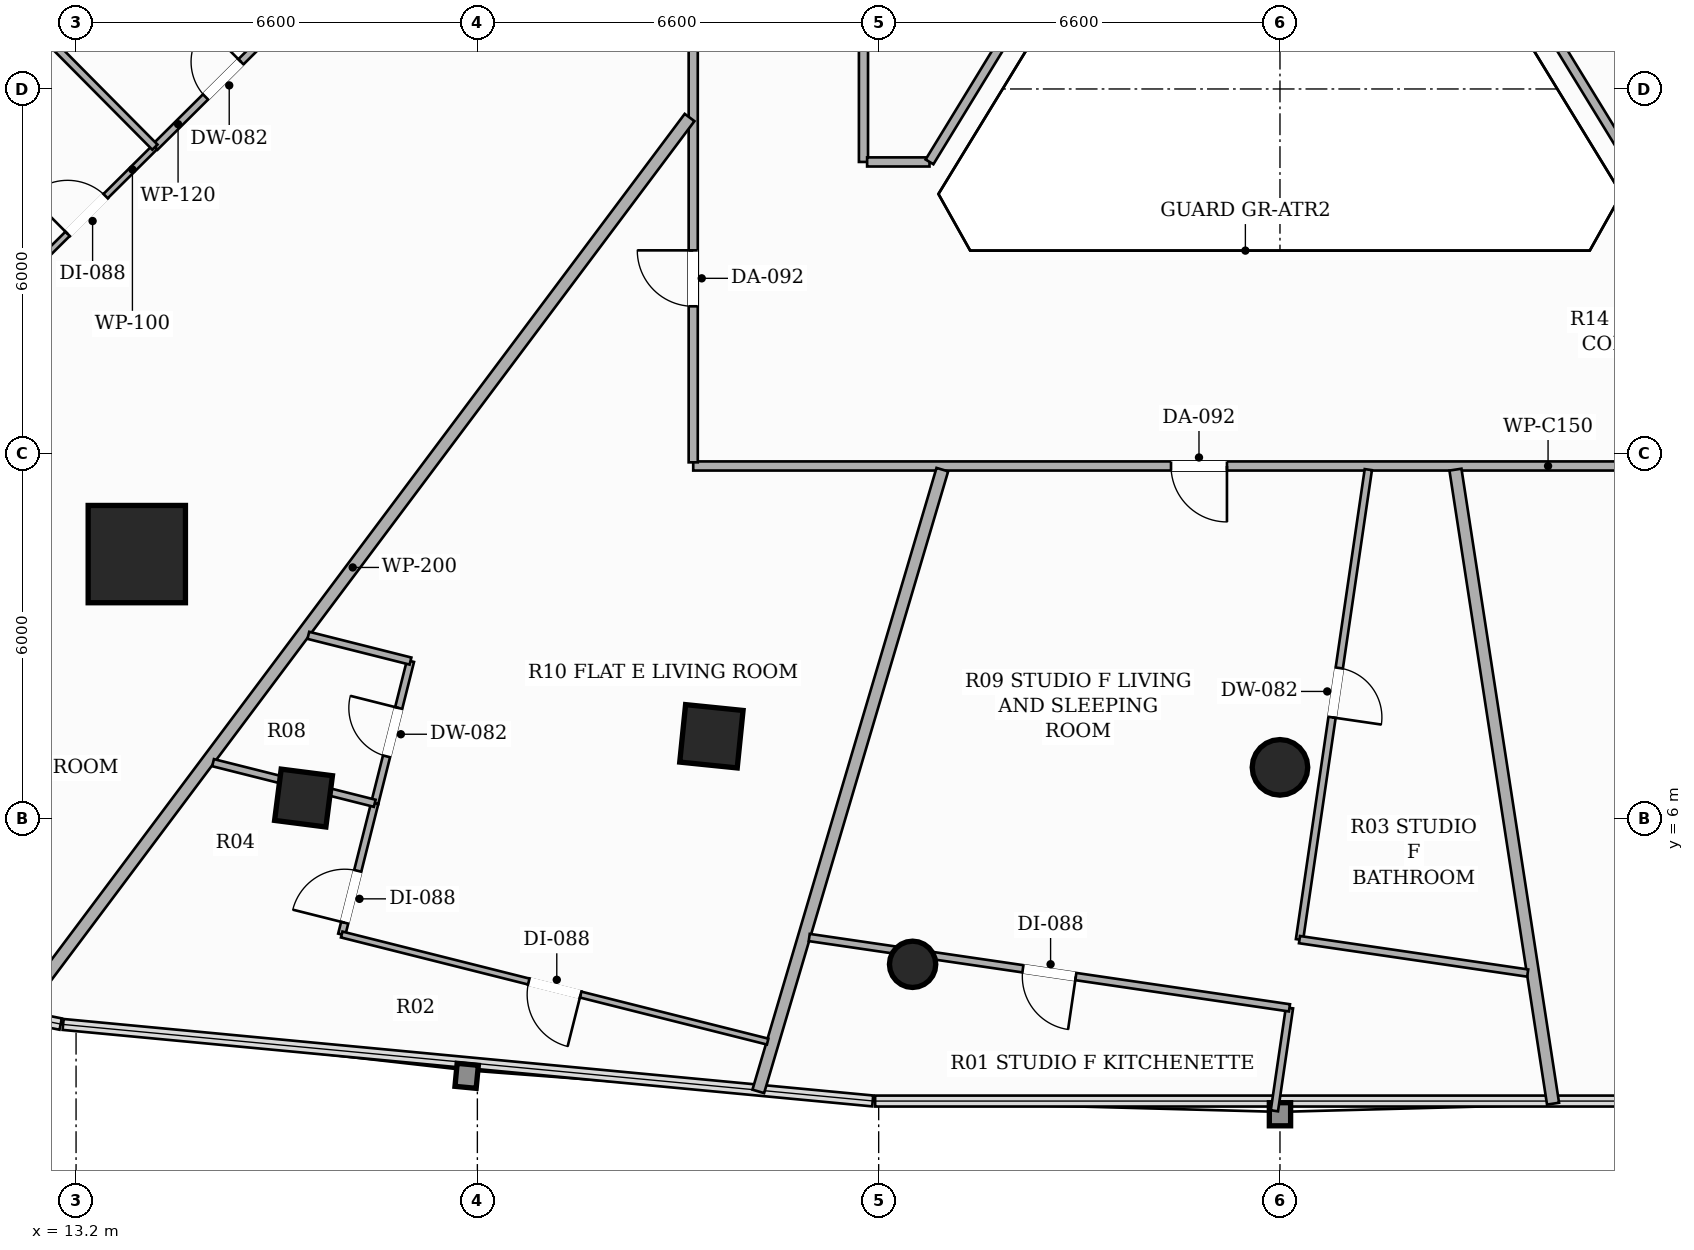
"""IFC4 building model, lengths in metres.
Left out: names, types, materials, properties, quantities, classifications, styles, units other than length and angle.
Written with IfcOpenShell. Run it as: python <this file> out.ifc"""

import sys

from ifc_helpers import new_model, si_unit, direction, frame, frame_2d, origin, origin_2d, place, context, subcontext, project, spatial, rectangle, hollow_rectangle, hollow_circle, extrude, element, fill, save


model = new_model("IFC4")
c1 = context("Model", 3, precision=1e-05, world=origin(), true_north=direction((0.0, 1.0)))
c2 = subcontext(c1, "Body", "Model", "MODEL_VIEW")
j1 = project(units=[si_unit("LENGTHUNIT", "METRE"), si_unit("PLANEANGLEUNIT", "RADIAN")], contexts=[c1])
p1 = place(None, origin())
s1 = spatial("IfcSite", under=j1, at=p1, CompositionType="ELEMENT")
p2 = place(p1, origin())
s2 = spatial("IfcBuilding", under=s1, at=p2, CompositionType="ELEMENT")
p3 = place(p2, frame((0.0, 0.0, 33.5)))
s3 = spatial("IfcBuildingStorey", under=s2, at=p3, CompositionType="ELEMENT", Elevation=33.5)
p4 = place(p3, frame((14.199, 10.351, 0.0), z_axis=(0.0, 0.0, 1.0), x_axis=(1.0, 0.0, 0.0)))
e1 = element("IfcColumn", 1, at=p4, inside=s3, PredefinedType="COLUMN", context=c2, shape_type="SweptSolid", body=[
    extrude(hollow_rectangle(XDim=1.6, YDim=1.6, WallThickness=0.05, at=origin_2d()), origin(), (0.0, 0.0, 1.0), 3.3),
])
p5 = place(p3, frame((23.649, 7.355, 0.0), z_axis=(0.0, 0.0, 1.0), x_axis=(-0.994880708829, 0.101056297183, 0.0)))
e2 = element("IfcColumn", 2, at=p5, inside=s3, PredefinedType="COLUMN", context=c2, shape_type="SweptSolid", body=[
    extrude(hollow_rectangle(XDim=0.95, YDim=0.95, WallThickness=0.032, at=origin_2d()), origin(), (0.0, 0.0, 1.0), 3.3),
])
p6 = place(p3, frame((33.0, 6.844, 0.0), z_axis=(0.0, 0.0, 1.0), x_axis=(1.0, 0.0, 0.0)))
e3 = element("IfcColumn", 3, at=p6, inside=s3, PredefinedType="COLUMN", context=c2, shape_type="SweptSolid", body=[
    extrude(hollow_circle(Radius=0.457, WallThickness=0.025, at=origin_2d()), origin(), (0.0, 0.0, 1.0), 3.3),
])
p7 = place(p3, frame((16.941, 6.339, 0.0), z_axis=(0.0, 0.0, 1.0), x_axis=(-0.99189444259, 0.127064608601, 0.0)))
e4 = element("IfcColumn", 4, at=p7, inside=s3, PredefinedType="COLUMN", context=c2, shape_type="SweptSolid", body=[
    extrude(hollow_rectangle(XDim=0.85, YDim=0.85, WallThickness=0.028, at=origin_2d()), origin(), (0.0, 0.0, 1.0), 3.3),
])
p8 = place(p3, frame((26.958, 3.605, 0.0), z_axis=(0.0, 0.0, 1.0), x_axis=(1.0, 0.0, 0.0)))
e5 = element("IfcColumn", 5, at=p8, inside=s3, PredefinedType="COLUMN", context=c2, shape_type="SweptSolid", body=[
    extrude(hollow_circle(Radius=0.381, WallThickness=0.022, at=origin_2d()), origin(), (0.0, 0.0, 1.0), 3.3),
])
p9 = place(p3, frame((42.59, 11.8, 0.0), z_axis=(0.0, 0.0, 1.0), x_axis=(-1.0, 0.0, 0.0)))
e6 = element("IfcWall", 6, at=p9, inside=s3, PredefinedType="PARTITIONING", context=c2, shape_type="SweptSolid", body=[
    extrude(rectangle(XDim=19.24, YDim=0.15, at=frame_2d((9.62, 0.0))), origin(), (0.0, 0.0, 1.0), 2.669),
])
p10 = place(p9, frame((10.462, 0.0, 0.0)))
e7 = element("IfcOpeningElement", 7, at=p10, cuts=e6, PredefinedType="OPENING", context=c2, shape_type="SweptSolid", body=[
    extrude(rectangle(XDim=0.92, YDim=2.15, at=frame_2d((0.46, 1.075))), frame((0.0, 0.085, 0.0), z_axis=(0.0, -1.0, 0.0), x_axis=(1.0, 0.0, 0.0)), (0.0, 0.0, 1.0), 0.17),
])
p11 = place(p3, frame((23.35, 11.86, 0.0), z_axis=(0.0, 0.0, 1.0), x_axis=(0.0, 1.0, 0.0)))
e8 = element("IfcWall", 8, at=p11, inside=s3, PredefinedType="PARTITIONING", context=c2, shape_type="SweptSolid", body=[
    extrude(rectangle(XDim=25.04, YDim=0.15, at=frame_2d((12.52, 0.0))), origin(), (0.0, 0.0, 1.0), 2.413),
])
p12 = place(p11, frame((9.29, 0.0, 0.0)))
e9 = element("IfcOpeningElement", 9, at=p12, cuts=e8, PredefinedType="OPENING", context=c2, shape_type="SweptSolid", body=[
    extrude(rectangle(XDim=0.92, YDim=2.15, at=frame_2d((0.46, 1.075))), frame((0.0, 0.085, 0.0), z_axis=(0.0, -1.0, 0.0), x_axis=(1.0, 0.0, 0.0)), (0.0, 0.0, 1.0), 0.17),
])
p13 = place(p11, frame((18.865, 0.0, 0.0)))
e10 = element("IfcOpeningElement", 10, at=p13, cuts=e8, PredefinedType="OPENING", context=c2, shape_type="SweptSolid", body=[
    extrude(rectangle(XDim=0.88, YDim=2.1, at=frame_2d((0.44, 1.05))), frame((0.0, 0.085, 0.0), z_axis=(0.0, -1.0, 0.0), x_axis=(1.0, 0.0, 0.0)), (0.0, 0.0, 1.0), 0.17),
])
p14 = place(p11, frame((2.566, 0.0, 0.0)))
e11 = element("IfcOpeningElement", 11, at=p14, cuts=e8, PredefinedType="OPENING", context=c2, shape_type="SweptSolid", body=[
    extrude(rectangle(XDim=0.92, YDim=2.15, at=frame_2d((0.46, 1.075))), frame((0.0, 0.085, 0.0), z_axis=(0.0, -1.0, 0.0), x_axis=(1.0, 0.0, 0.0)), (0.0, 0.0, 1.0), 0.17),
])
p15 = place(p3, frame((26.15, 23.79, 0.0), z_axis=(0.0, 0.0, 1.0), x_axis=(0.0, -1.0, 0.0)))
e12 = element("IfcWall", 12, at=p15, inside=s3, PredefinedType="PARTITIONING", context=c2, shape_type="SweptSolid", body=[
    extrude(rectangle(XDim=6.99, YDim=0.15, at=frame_2d((3.495, 0.0))), origin(), (0.0, 0.0, 1.0), 2.669),
])
p16 = place(p15, frame((3.055, 0.0, 0.0)))
e13 = element("IfcOpeningElement", 13, at=p16, cuts=e12, PredefinedType="OPENING", context=c2, shape_type="SweptSolid", body=[
    extrude(rectangle(XDim=0.88, YDim=2.1, at=frame_2d((0.44, 1.05))), frame((0.0, 0.085, 0.0), z_axis=(0.0, -1.0, 0.0), x_axis=(1.0, 0.0, 0.0)), (0.0, 0.0, 1.0), 0.17),
])
p17 = place(p3, frame((26.21, 16.8, 0.0), z_axis=(0.0, 0.0, 1.0), x_axis=(1.0, 0.0, 0.0)))
e14 = element("IfcWall", 14, at=p17, inside=s3, PredefinedType="PARTITIONING", context=c2, shape_type="SweptSolid", body=[
    extrude(rectangle(XDim=1.026, YDim=0.15, at=frame_2d((0.513, 0.0))), origin(), (0.0, 0.0, 1.0), 3.06),
])
p18 = place(p3, frame((27.236, 16.801, 0.0), z_axis=(0.0, 0.0, 1.0), x_axis=(0.521617567684, 0.853179414358, 0.0)))
e15 = element("IfcWall", 15, at=p18, inside=s3, PredefinedType="PARTITIONING", context=c2, shape_type="SweptSolid", body=[
    extrude(rectangle(XDim=8.192, YDim=0.15, at=frame_2d((4.096, 0.0))), origin(), (0.0, 0.0, 1.0), 2.669),
])
p19 = place(p3, frame((34.486, 23.79, 0.0), z_axis=(0.0, 0.0, 1.0), x_axis=(0.521998190399, -0.852946592244, 0.0)))
e16 = element("IfcWall", 16, at=p19, inside=s3, PredefinedType="PARTITIONING", context=c2, shape_type="SweptSolid", body=[
    extrude(rectangle(XDim=8.195, YDim=0.15, at=frame_2d((4.098, 0.0))), origin(), (0.0, 0.0, 1.0), 2.669),
])
p20 = place(p3, frame((23.29, 17.531, 0.0), z_axis=(0.0, 0.0, 1.0), x_axis=(-0.599334217596, -0.800498904196, 0.0)))
e17 = element("IfcWall", 17, at=p20, inside=s3, PredefinedType="PARTITIONING", context=c2, shape_type="SweptSolid", body=[
    extrude(rectangle(XDim=18.487, YDim=0.2, at=frame_2d((9.244, 0.0))), origin(), (0.0, 0.0, 1.0), 2.413),
])
p21 = place(p3, frame((37.491, 1.313, 0.0), z_axis=(0.0, 0.0, 1.0), x_axis=(-0.152133698634, 0.988359923176, 0.0)))
e18 = element("IfcWall", 18, at=p21, inside=s3, PredefinedType="PARTITIONING", context=c2, shape_type="SweptSolid", body=[
    extrude(rectangle(XDim=10.55, YDim=0.2, at=frame_2d((5.275, 0.0))), origin(), (0.0, 0.0, 1.0), 2.413),
])
p22 = place(p3, frame((27.447, 11.74, 0.0), z_axis=(0.0, 0.0, 1.0), x_axis=(-0.283867721737, -0.958863450422, 0.0)))
e19 = element("IfcWall", 19, at=p22, inside=s3, PredefinedType="PARTITIONING", context=c2, shape_type="SweptSolid", body=[
    extrude(rectangle(XDim=10.664, YDim=0.2, at=frame_2d((5.332, 0.0))), origin(), (0.0, 0.0, 1.0), 2.413),
])
p23 = place(p3, frame((14.497, 17.043, 0.0), z_axis=(0.0, 0.0, 1.0), x_axis=(0.709608291954, 0.704596389425, 0.0)))
e20 = element("IfcWall", 20, at=p23, inside=s3, PredefinedType="PARTITIONING", context=c2, shape_type="SweptSolid", body=[
    extrude(rectangle(XDim=3.166, YDim=0.12, at=frame_2d((1.583, 0.0))), origin(), (0.0, 0.0, 1.0), 2.413),
])
p24 = place(p23, frame((1.173, 0.0, 0.0)))
e21 = element("IfcOpeningElement", 21, at=p24, cuts=e20, PredefinedType="OPENING", context=c2, shape_type="SweptSolid", body=[
    extrude(rectangle(XDim=0.82, YDim=2.1, at=frame_2d((0.41, 1.05))), frame((0.0, 0.07, 0.0), z_axis=(0.0, -1.0, 0.0), x_axis=(1.0, 0.0, 0.0)), (0.0, 0.0, 1.0), 0.14),
])
p25 = place(p3, frame((12.249, 14.812, 0.0), z_axis=(0.0, 0.0, 1.0), x_axis=(0.70979961262, 0.70440365553, 0.0)))
e22 = element("IfcWall", 22, at=p25, inside=s3, PredefinedType="PARTITIONING", context=c2, shape_type="SweptSolid", body=[
    extrude(rectangle(XDim=3.167, YDim=0.1, at=frame_2d((1.583, 0.0))), origin(), (0.0, 0.0, 1.0), 2.413),
])
p26 = place(p25, frame((1.144, 0.0, 0.0)))
e23 = element("IfcOpeningElement", 23, at=p26, cuts=e22, PredefinedType="OPENING", context=c2, shape_type="SweptSolid", body=[
    extrude(rectangle(XDim=0.88, YDim=2.1, at=frame_2d((0.44, 1.05))), frame((0.0, 0.06, 0.0), z_axis=(0.0, -1.0, 0.0), x_axis=(1.0, 0.0, 0.0)), (0.0, 0.0, 1.0), 0.12),
])
p27 = place(p3, frame((14.497, 17.043, 0.0), z_axis=(0.0, 0.0, 1.0), x_axis=(-0.704380529073, 0.70982256252, 0.0)))
e24 = element("IfcWall", 24, at=p27, inside=s3, PredefinedType="PARTITIONING", context=c2, shape_type="SweptSolid", body=[
    extrude(rectangle(XDim=4.038, YDim=0.12, at=frame_2d((2.019, 0.0))), origin(), (0.0, 0.0, 1.0), 2.413),
])
p28 = place(p3, frame((18.112, 6.253, 0.0), z_axis=(0.0, 0.0, 1.0), x_axis=(0.2437501366, 0.96983806427, 0.0)))
e25 = element("IfcWall", 25, at=p28, inside=s3, PredefinedType="PARTITIONING", context=c2, shape_type="SweptSolid", body=[
    extrude(rectangle(XDim=2.412, YDim=0.12, at=frame_2d((1.206, 0.0))), origin(), (0.0, 0.0, 1.0), 2.413),
])
p29 = place(p28, frame((0.796, 0.0, 0.0)))
e26 = element("IfcOpeningElement", 26, at=p29, cuts=e25, PredefinedType="OPENING", context=c2, shape_type="SweptSolid", body=[
    extrude(rectangle(XDim=0.82, YDim=2.1, at=frame_2d((0.41, 1.05))), frame((0.0, 0.07, 0.0), z_axis=(0.0, -1.0, 0.0), x_axis=(1.0, 0.0, 0.0)), (0.0, 0.0, 1.0), 0.14),
])
p30 = place(p3, frame((18.7, 8.592, 0.0), z_axis=(0.0, 0.0, 1.0), x_axis=(-0.969751613308, 0.244093851802, 0.0)))
e27 = element("IfcWall", 27, at=p30, inside=s3, PredefinedType="PARTITIONING", context=c2, shape_type="SweptSolid", body=[
    extrude(rectangle(XDim=1.732, YDim=0.12, at=frame_2d((0.866, 0.0))), origin(), (0.0, 0.0, 1.0), 2.669),
])
p31 = place(p3, frame((17.569, 4.095, 0.0), z_axis=(0.0, 0.0, 1.0), x_axis=(0.244006821807, 0.969773515266, 0.0)))
e28 = element("IfcWall", 28, at=p31, inside=s3, PredefinedType="PARTITIONING", context=c2, shape_type="SweptSolid", body=[
    extrude(rectangle(XDim=2.225, YDim=0.12, at=frame_2d((1.113, 0.0))), origin(), (0.0, 0.0, 1.0), 2.413),
])
p32 = place(p31, frame((0.2, 0.0, 0.0)))
e29 = element("IfcOpeningElement", 29, at=p32, cuts=e28, PredefinedType="OPENING", context=c2, shape_type="SweptSolid", body=[
    extrude(rectangle(XDim=0.88, YDim=2.1, at=frame_2d((0.44, 1.05))), frame((0.0, 0.07, 0.0), z_axis=(0.0, -1.0, 0.0), x_axis=(1.0, 0.0, 0.0)), (0.0, 0.0, 1.0), 0.14),
])
p33 = place(p3, frame((24.574, 2.334, 0.0), z_axis=(0.0, 0.0, 1.0), x_axis=(-0.9698235368, 0.243807931512, 0.0)))
e30 = element("IfcWall", 30, at=p33, inside=s3, PredefinedType="PARTITIONING", context=c2, shape_type="SweptSolid", body=[
    extrude(rectangle(XDim=7.223, YDim=0.1, at=frame_2d((3.611, 0.0))), origin(), (0.0, 0.0, 1.0), 3.06),
])
p34 = place(p33, frame((3.171, 0.0, 0.0)))
e31 = element("IfcOpeningElement", 31, at=p34, cuts=e30, PredefinedType="OPENING", context=c2, shape_type="SweptSolid", body=[
    extrude(rectangle(XDim=0.88, YDim=2.1, at=frame_2d((0.44, 1.05))), frame((0.0, 0.06, 0.0), z_axis=(0.0, -1.0, 0.0), x_axis=(1.0, 0.0, 0.0)), (0.0, 0.0, 1.0), 0.12),
])
p35 = place(p3, frame((18.112, 6.253, 0.0), z_axis=(0.0, 0.0, 1.0), x_axis=(-0.969869517874, 0.243624954178, 0.0)))
e32 = element("IfcWall", 32, at=p35, inside=s3, PredefinedType="PARTITIONING", context=c2, shape_type="SweptSolid", body=[
    extrude(rectangle(XDim=2.742, YDim=0.12, at=frame_2d((1.371, 0.0))), origin(), (0.0, 0.0, 1.0), 2.413),
])
p36 = place(p3, frame((34.453, 11.74, 0.0), z_axis=(0.0, 0.0, 1.0), x_axis=(-0.14489470787, -0.989447079753, 0.0)))
e33 = element("IfcWall", 33, at=p36, inside=s3, PredefinedType="PARTITIONING", context=c2, shape_type="SweptSolid", body=[
    extrude(rectangle(XDim=7.812, YDim=0.12, at=frame_2d((3.906, 0.0))), origin(), (0.0, 0.0, 1.0), 2.413),
])
p37 = place(p36, frame((3.297, 0.0, 0.0)))
e34 = element("IfcOpeningElement", 34, at=p37, cuts=e33, PredefinedType="OPENING", context=c2, shape_type="SweptSolid", body=[
    extrude(rectangle(XDim=0.82, YDim=2.1, at=frame_2d((0.41, 1.05))), frame((0.0, 0.07, 0.0), z_axis=(0.0, -1.0, 0.0), x_axis=(1.0, 0.0, 0.0)), (0.0, 0.0, 1.0), 0.14),
])
p38 = place(p3, frame((33.321, 4.011, 0.0), z_axis=(0.0, 0.0, 1.0), x_axis=(0.98942932615, -0.145015890698, 0.0)))
e35 = element("IfcWall", 35, at=p38, inside=s3, PredefinedType="PARTITIONING", context=c2, shape_type="SweptSolid", body=[
    extrude(rectangle(XDim=3.793, YDim=0.12, at=frame_2d((1.896, 0.0))), origin(), (0.0, 0.0, 1.0), 3.06),
])
p39 = place(p3, frame((32.908, 1.196, 0.0), z_axis=(0.0, 0.0, 1.0), x_axis=(0.144976360118, 0.98943511915, 0.0)))
e36 = element("IfcWall", 36, at=p39, inside=s3, PredefinedType="PARTITIONING", context=c2, shape_type="SweptSolid", body=[
    extrude(rectangle(XDim=1.711, YDim=0.12, at=frame_2d((0.855, 0.0))), origin(), (0.0, 0.0, 1.0), 3.06),
])
p40 = place(p3, frame((33.156, 2.889, 0.0), z_axis=(0.0, 0.0, 1.0), x_axis=(-0.98943978436, 0.144944517406, 0.0)))
e37 = element("IfcWall", 37, at=p40, inside=s3, PredefinedType="PARTITIONING", context=c2, shape_type="SweptSolid", body=[
    extrude(rectangle(XDim=7.982, YDim=0.12, at=frame_2d((3.991, 0.0))), origin(), (0.0, 0.0, 1.0), 2.413),
])
p41 = place(p40, frame((3.551, 0.0, 0.0)))
e38 = element("IfcOpeningElement", 38, at=p41, cuts=e37, PredefinedType="OPENING", context=c2, shape_type="SweptSolid", body=[
    extrude(rectangle(XDim=0.88, YDim=2.1, at=frame_2d((0.44, 1.05))), frame((0.0, 0.07, 0.0), z_axis=(0.0, -1.0, 0.0), x_axis=(1.0, 0.0, 0.0)), (0.0, 0.0, 1.0), 0.14),
])
p42 = place(p24, origin())
e39 = element("IfcDoor", 39, at=p42, inside=s3, OperationType="SINGLE_SWING_RIGHT", PredefinedType="DOOR", context=c2, shape_type="SweptSolid", body=[
    extrude(rectangle(XDim=0.82, YDim=2.1, at=frame_2d((0.41, 1.05))), frame((0.0, 0.025, 0.0), z_axis=(0.0, -1.0, 0.0), x_axis=(1.0, 0.0, 0.0)), (0.0, 0.0, 1.0), 0.05),
])
fill(e21, e39)
p43 = place(p26, origin())
e40 = element("IfcDoor", 40, at=p43, inside=s3, OperationType="SINGLE_SWING_LEFT", PredefinedType="DOOR", context=c2, shape_type="SweptSolid", body=[
    extrude(rectangle(XDim=0.88, YDim=2.1, at=frame_2d((0.44, 1.05))), frame((0.0, 0.025, 0.0), z_axis=(0.0, -1.0, 0.0), x_axis=(1.0, 0.0, 0.0)), (0.0, 0.0, 1.0), 0.05),
])
fill(e23, e40)
p44 = place(p14, origin())
e41 = element("IfcDoor", 41, at=p44, inside=s3, OperationType="SINGLE_SWING_RIGHT", PredefinedType="DOOR", context=c2, shape_type="SweptSolid", body=[
    extrude(rectangle(XDim=0.92, YDim=2.15, at=frame_2d((0.46, 1.075))), frame((0.0, 0.025, 0.0), z_axis=(0.0, -1.0, 0.0), x_axis=(1.0, 0.0, 0.0)), (0.0, 0.0, 1.0), 0.05),
])
fill(e11, e41)
p45 = place(p29, origin())
e42 = element("IfcDoor", 42, at=p45, inside=s3, OperationType="SINGLE_SWING_RIGHT", PredefinedType="DOOR", context=c2, shape_type="SweptSolid", body=[
    extrude(rectangle(XDim=0.82, YDim=2.1, at=frame_2d((0.41, 1.05))), frame((0.0, 0.025, 0.0), z_axis=(0.0, -1.0, 0.0), x_axis=(1.0, 0.0, 0.0)), (0.0, 0.0, 1.0), 0.05),
])
fill(e26, e42)
p46 = place(p32, origin())
e43 = element("IfcDoor", 43, at=p46, inside=s3, OperationType="SINGLE_SWING_LEFT", PredefinedType="DOOR", context=c2, shape_type="SweptSolid", body=[
    extrude(rectangle(XDim=0.88, YDim=2.1, at=frame_2d((0.44, 1.05))), frame((0.0, 0.025, 0.0), z_axis=(0.0, -1.0, 0.0), x_axis=(1.0, 0.0, 0.0)), (0.0, 0.0, 1.0), 0.05),
])
fill(e29, e43)
p47 = place(p34, origin())
e44 = element("IfcDoor", 44, at=p47, inside=s3, OperationType="SINGLE_SWING_LEFT", PredefinedType="DOOR", context=c2, shape_type="SweptSolid", body=[
    extrude(rectangle(XDim=0.88, YDim=2.1, at=frame_2d((0.44, 1.05))), frame((0.0, 0.025, 0.0), z_axis=(0.0, -1.0, 0.0), x_axis=(1.0, 0.0, 0.0)), (0.0, 0.0, 1.0), 0.05),
])
fill(e31, e44)
p48 = place(p10, origin())
e45 = element("IfcDoor", 45, at=p48, inside=s3, OperationType="SINGLE_SWING_LEFT", PredefinedType="DOOR", context=c2, shape_type="SweptSolid", body=[
    extrude(rectangle(XDim=0.92, YDim=2.15, at=frame_2d((0.46, 1.075))), frame((0.0, 0.025, 0.0), z_axis=(0.0, -1.0, 0.0), x_axis=(1.0, 0.0, 0.0)), (0.0, 0.0, 1.0), 0.05),
])
fill(e7, e45)
p49 = place(p37, origin())
e46 = element("IfcDoor", 46, at=p49, inside=s3, OperationType="SINGLE_SWING_RIGHT", PredefinedType="DOOR", context=c2, shape_type="SweptSolid", body=[
    extrude(rectangle(XDim=0.82, YDim=2.1, at=frame_2d((0.41, 1.05))), frame((0.0, 0.025, 0.0), z_axis=(0.0, -1.0, 0.0), x_axis=(1.0, 0.0, 0.0)), (0.0, 0.0, 1.0), 0.05),
])
fill(e34, e46)
p50 = place(p41, origin())
e47 = element("IfcDoor", 47, at=p50, inside=s3, OperationType="SINGLE_SWING_LEFT", PredefinedType="DOOR", context=c2, shape_type="SweptSolid", body=[
    extrude(rectangle(XDim=0.88, YDim=2.1, at=frame_2d((0.44, 1.05))), frame((0.0, 0.025, 0.0), z_axis=(0.0, -1.0, 0.0), x_axis=(1.0, 0.0, 0.0)), (0.0, 0.0, 1.0), 0.05),
])
fill(e38, e47)
save(model, sys.argv[1])
